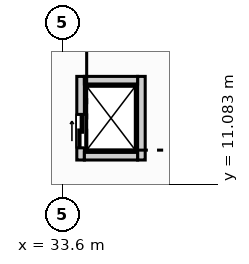
"""IFC4 building model, lengths in metres.
Left out: names, types, materials, properties, quantities, classifications, styles, units other than length and angle.
Written with IfcOpenShell. Run it as: python <this file> out.ifc"""

import sys

from ifc_helpers import new_model, si_unit, direction, frame, frame_2d, origin, place, context, subcontext, project, spatial, rectangle, extrude, element, fill, save


model = new_model("IFC4")
c1 = context("Model", 3, precision=1e-05, world=origin(), true_north=direction((0.0, 1.0)))
c2 = subcontext(c1, "Body", "Model", "MODEL_VIEW")
j1 = project(units=[si_unit("LENGTHUNIT", "METRE"), si_unit("PLANEANGLEUNIT", "RADIAN")], contexts=[c1])
p1 = place(None, origin())
s1 = spatial("IfcSite", under=j1, at=p1, CompositionType="ELEMENT")
p2 = place(p1, origin())
s2 = spatial("IfcBuilding", under=s1, at=p2, CompositionType="ELEMENT")
p3 = place(p2, frame((0.0, 0.0, -8.4)))
s3 = spatial("IfcBuildingStorey", under=s2, at=p3, CompositionType="ELEMENT", Elevation=-8.4)
p4 = place(p3, frame((34.2, 11.875, 0.0), z_axis=(0.0, 0.0, 1.0), x_axis=(0.0, 1.0, 0.0)))
e1 = element("IfcWall", 1, at=p4, inside=s3, PredefinedType="SOLIDWALL", context=c2, shape_type="SweptSolid", body=[
    extrude(rectangle(XDim=2.75, YDim=0.25, at=frame_2d((1.375, 0.0))), origin(), (0.0, 0.0, 1.0), 3.85),
])
p5 = place(p4, frame((0.4, 0.0, 0.0)))
e2 = element("IfcOpeningElement", 2, at=p5, cuts=e1, PredefinedType="OPENING", context=c2, shape_type="SweptSolid", body=[
    extrude(rectangle(XDim=1.1, YDim=2.15, at=frame_2d((0.55, 1.075))), frame((0.0, 0.135, 0.0), z_axis=(0.0, -1.0, 0.0), x_axis=(1.0, 0.0, 0.0)), (0.0, 0.0, 1.0), 0.27),
])
p6 = place(p3, frame((36.2, 11.875, 0.0), z_axis=(0.0, 0.0, 1.0), x_axis=(0.0, 1.0, 0.0)))
e3 = element("IfcWall", 3, at=p6, inside=s3, PredefinedType="SOLIDWALL", context=c2, shape_type="SweptSolid", body=[
    extrude(rectangle(XDim=2.75, YDim=0.25, at=frame_2d((1.375, 0.0))), origin(), (0.0, 0.0, 1.0), 3.85),
])
for number, where, z_axis, x_axis in (
    (4, (34.325, 12.0, 0.0), (0.0, 0.0, 1.0), (1.0, 0.0, 0.0)),
    (5, (34.325, 14.5, 0.0), (0.0, 0.0, 1.0), (1.0, 0.0, 0.0)),
):
    element("IfcWall", number, at=place(p3, frame(where, z_axis=z_axis, x_axis=x_axis)), inside=s3, PredefinedType="SOLIDWALL", context=c2, shape_type="SweptSolid", body=[
        extrude(rectangle(XDim=1.75, YDim=0.25, at=frame_2d((0.875, 0.0))), origin(), (0.0, 0.0, 1.0), 3.85),
    ])
p7 = place(p5, origin())
e6 = element("IfcDoor", 6, at=p7, inside=s3, OperationType="SLIDING_TO_LEFT", PredefinedType="DOOR", context=c2, shape_type="SweptSolid", body=[
    extrude(rectangle(XDim=1.1, YDim=2.15, at=frame_2d((0.55, 1.075))), frame((0.0, 0.025, 0.0), z_axis=(0.0, -1.0, 0.0), x_axis=(1.0, 0.0, 0.0)), (0.0, 0.0, 1.0), 0.05),
])
fill(e2, e6)
save(model, sys.argv[1])
